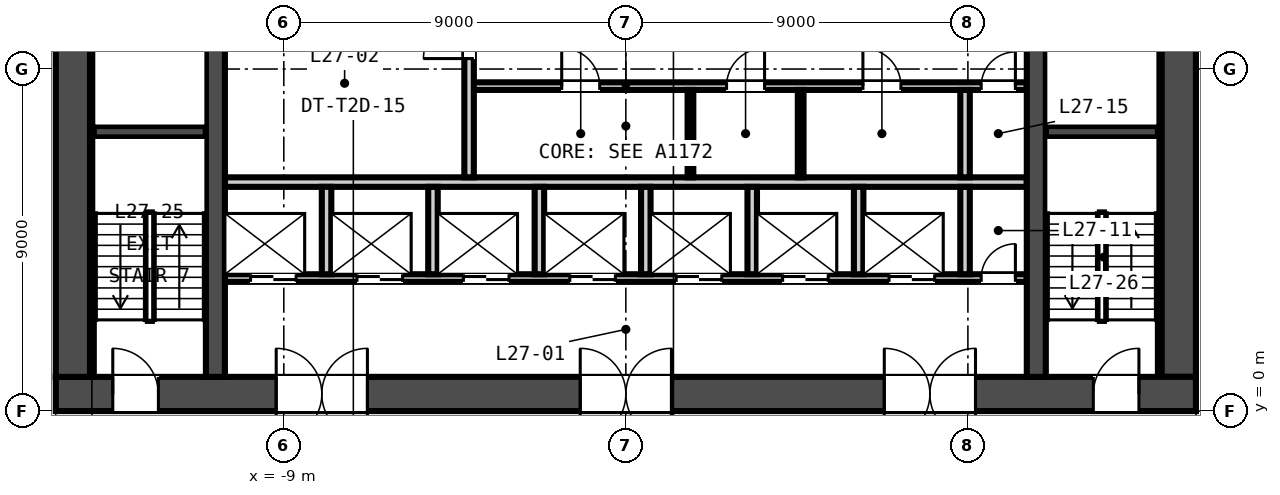
"""IFC4 building model, lengths in metres.
Left out: names, types, materials, properties, quantities, classifications, styles, units other than length and angle.
Written with IfcOpenShell. Run it as: python <this file> out.ifc"""

import sys

from ifc_helpers import new_model, si_unit, direction, frame, frame_2d, origin, place, context, subcontext, project, spatial, rectangle, extrude, element, fill, save


model = new_model("IFC4")
c1 = context("Model", 3, precision=1e-05, world=origin(), true_north=direction((0.0, 1.0)))
c2 = subcontext(c1, "Body", "Model", "MODEL_VIEW")
j1 = project(units=[si_unit("LENGTHUNIT", "METRE"), si_unit("PLANEANGLEUNIT", "RADIAN")], contexts=[c1])
p1 = place(None, origin())
s1 = spatial("IfcSite", under=j1, at=p1, CompositionType="ELEMENT")
p2 = place(p1, origin())
s2 = spatial("IfcBuilding", under=s1, at=p2, CompositionType="ELEMENT")
p3 = place(p2, frame((0.0, 0.0, 113.5)))
s3 = spatial("IfcBuildingStorey", under=s2, at=p3, CompositionType="ELEMENT", Elevation=113.5)
p4 = place(p3, frame((-15.0, 0.45, -0.15), z_axis=(0.0, 0.0, 1.0), x_axis=(1.0, 0.0, 0.0)))
e1 = element("IfcWall", 1, at=p4, inside=s3, PredefinedType="SOLIDWALL", context=c2, shape_type="SweptSolid", body=[
    extrude(rectangle(XDim=30.0, YDim=0.9, at=frame_2d((15.0, 0.0))), origin(), (0.0, 0.0, 1.0), 3.5),
])
p5 = place(p4, frame((5.8, 0.0, 0.15)))
e2 = element("IfcOpeningElement", 2, at=p5, cuts=e1, PredefinedType="OPENING", context=c2, shape_type="SweptSolid", body=[
    extrude(rectangle(XDim=2.4, YDim=2.4, at=frame_2d((1.2, 1.2))), frame((0.0, 0.46, 0.0), z_axis=(0.0, -1.0, 0.0), x_axis=(1.0, 0.0, 0.0)), (0.0, 0.0, 1.0), 0.92),
])
p6 = place(p4, frame((13.8, 0.0, 0.15)))
e3 = element("IfcOpeningElement", 3, at=p6, cuts=e1, PredefinedType="OPENING", context=c2, shape_type="SweptSolid", body=[
    extrude(rectangle(XDim=2.4, YDim=2.4, at=frame_2d((1.2, 1.2))), frame((0.0, 0.46, 0.0), z_axis=(0.0, -1.0, 0.0), x_axis=(1.0, 0.0, 0.0)), (0.0, 0.0, 1.0), 0.92),
])
p7 = place(p4, frame((21.8, 0.0, 0.15)))
e4 = element("IfcOpeningElement", 4, at=p7, cuts=e1, PredefinedType="OPENING", context=c2, shape_type="SweptSolid", body=[
    extrude(rectangle(XDim=2.4, YDim=2.4, at=frame_2d((1.2, 1.2))), frame((0.0, 0.46, 0.0), z_axis=(0.0, -1.0, 0.0), x_axis=(1.0, 0.0, 0.0)), (0.0, 0.0, 1.0), 0.92),
])
p8 = place(p4, frame((1.5, 0.0, 0.15)))
e5 = element("IfcOpeningElement", 5, at=p8, cuts=e1, PredefinedType="OPENING", context=c2, shape_type="SweptSolid", body=[
    extrude(rectangle(XDim=1.2, YDim=2.1, at=frame_2d((0.6, 1.05))), frame((0.0, 0.46, 0.0), z_axis=(0.0, -1.0, 0.0), x_axis=(1.0, 0.0, 0.0)), (0.0, 0.0, 1.0), 0.92),
])
p9 = place(p4, frame((27.3, 0.0, 0.15)))
e6 = element("IfcOpeningElement", 6, at=p9, cuts=e1, PredefinedType="OPENING", context=c2, shape_type="SweptSolid", body=[
    extrude(rectangle(XDim=1.2, YDim=2.1, at=frame_2d((0.6, 1.05))), frame((0.0, 0.46, 0.0), z_axis=(0.0, -1.0, 0.0), x_axis=(1.0, 0.0, 0.0)), (0.0, 0.0, 1.0), 0.92),
])
for number, where, z_axis, x_axis in (
    (7, (-14.55, 0.9, -0.15), (0.0, 0.0, 1.0), (0.0, 1.0, 0.0)),
    (8, (14.55, 0.9, -0.15), (0.0, 0.0, 1.0), (0.0, 1.0, 0.0)),
):
    element("IfcWall", number, at=place(p3, frame(where, z_axis=z_axis, x_axis=x_axis)), inside=s3, PredefinedType="SOLIDWALL", context=c2, shape_type="SweptSolid", body=[
        extrude(rectangle(XDim=13.2, YDim=0.9, at=frame_2d((6.6, 0.0))), origin(), (0.0, 0.0, 1.0), 3.5),
    ])
for number, where, z_axis, x_axis in (
    (9, (-10.8, 0.9, -0.15), (0.0, 0.0, 1.0), (0.0, 1.0, 0.0)),
    (10, (10.8, 0.9, -0.15), (0.0, 0.0, 1.0), (0.0, 1.0, 0.0)),
):
    element("IfcWall", number, at=place(p3, frame(where, z_axis=z_axis, x_axis=x_axis)), inside=s3, PredefinedType="SOLIDWALL", context=c2, shape_type="SweptSolid", body=[
        extrude(rectangle(XDim=13.2, YDim=0.5, at=frame_2d((6.6, 0.0))), origin(), (0.0, 0.0, 1.0), 3.5),
    ])
p10 = place(p3, frame((-10.55, 3.5, 0.0), z_axis=(0.0, 0.0, 1.0), x_axis=(1.0, 0.0, 0.0)))
e11 = element("IfcWall", 11, at=p10, inside=s3, PredefinedType="PARTITIONING", context=c2, shape_type="SweptSolid", body=[
    extrude(rectangle(XDim=21.1, YDim=0.2, at=frame_2d((10.55, 0.0))), origin(), (0.0, 0.0, 1.0), 3.35),
])
p11 = place(p10, frame((0.675, 0.0, 0.0)))
e12 = element("IfcOpeningElement", 12, at=p11, cuts=e11, PredefinedType="OPENING", context=c2, shape_type="SweptSolid", body=[
    extrude(rectangle(XDim=1.2, YDim=2.1, at=frame_2d((0.6, 1.05))), frame((0.0, 0.11, 0.0), z_axis=(0.0, -1.0, 0.0), x_axis=(1.0, 0.0, 0.0)), (0.0, 0.0, 1.0), 0.22),
])
p12 = place(p10, frame((3.475, 0.0, 0.0)))
e13 = element("IfcOpeningElement", 13, at=p12, cuts=e11, PredefinedType="OPENING", context=c2, shape_type="SweptSolid", body=[
    extrude(rectangle(XDim=1.2, YDim=2.1, at=frame_2d((0.6, 1.05))), frame((0.0, 0.11, 0.0), z_axis=(0.0, -1.0, 0.0), x_axis=(1.0, 0.0, 0.0)), (0.0, 0.0, 1.0), 0.22),
])
p13 = place(p10, frame((6.275, 0.0, 0.0)))
e14 = element("IfcOpeningElement", 14, at=p13, cuts=e11, PredefinedType="OPENING", context=c2, shape_type="SweptSolid", body=[
    extrude(rectangle(XDim=1.2, YDim=2.1, at=frame_2d((0.6, 1.05))), frame((0.0, 0.11, 0.0), z_axis=(0.0, -1.0, 0.0), x_axis=(1.0, 0.0, 0.0)), (0.0, 0.0, 1.0), 0.22),
])
p14 = place(p10, frame((9.075, 0.0, 0.0)))
e15 = element("IfcOpeningElement", 15, at=p14, cuts=e11, PredefinedType="OPENING", context=c2, shape_type="SweptSolid", body=[
    extrude(rectangle(XDim=1.2, YDim=2.1, at=frame_2d((0.6, 1.05))), frame((0.0, 0.11, 0.0), z_axis=(0.0, -1.0, 0.0), x_axis=(1.0, 0.0, 0.0)), (0.0, 0.0, 1.0), 0.22),
])
p15 = place(p10, frame((11.875, 0.0, 0.0)))
e16 = element("IfcOpeningElement", 16, at=p15, cuts=e11, PredefinedType="OPENING", context=c2, shape_type="SweptSolid", body=[
    extrude(rectangle(XDim=1.2, YDim=2.1, at=frame_2d((0.6, 1.05))), frame((0.0, 0.11, 0.0), z_axis=(0.0, -1.0, 0.0), x_axis=(1.0, 0.0, 0.0)), (0.0, 0.0, 1.0), 0.22),
])
p16 = place(p10, frame((14.675, 0.0, 0.0)))
e17 = element("IfcOpeningElement", 17, at=p16, cuts=e11, PredefinedType="OPENING", context=c2, shape_type="SweptSolid", body=[
    extrude(rectangle(XDim=1.2, YDim=2.1, at=frame_2d((0.6, 1.05))), frame((0.0, 0.11, 0.0), z_axis=(0.0, -1.0, 0.0), x_axis=(1.0, 0.0, 0.0)), (0.0, 0.0, 1.0), 0.22),
])
p17 = place(p10, frame((17.475, 0.0, 0.0)))
e18 = element("IfcOpeningElement", 18, at=p17, cuts=e11, PredefinedType="OPENING", context=c2, shape_type="SweptSolid", body=[
    extrude(rectangle(XDim=1.2, YDim=2.1, at=frame_2d((0.6, 1.05))), frame((0.0, 0.11, 0.0), z_axis=(0.0, -1.0, 0.0), x_axis=(1.0, 0.0, 0.0)), (0.0, 0.0, 1.0), 0.22),
])
p18 = place(p10, frame((19.9, 0.0, 0.0)))
e19 = element("IfcOpeningElement", 19, at=p18, cuts=e11, PredefinedType="OPENING", context=c2, shape_type="SweptSolid", body=[
    extrude(rectangle(XDim=0.9, YDim=2.1, at=frame_2d((0.45, 1.05))), frame((0.0, 0.11, 0.0), z_axis=(0.0, -1.0, 0.0), x_axis=(1.0, 0.0, 0.0)), (0.0, 0.0, 1.0), 0.22),
])
p19 = place(p3, frame((-10.55, 6.025, 0.0), z_axis=(0.0, 0.0, 1.0), x_axis=(1.0, 0.0, 0.0)))
e20 = element("IfcWall", 20, at=p19, inside=s3, PredefinedType="PARTITIONING", context=c2, shape_type="SweptSolid", body=[
    extrude(rectangle(XDim=21.1, YDim=0.25, at=frame_2d((10.55, 0.0))), origin(), (0.0, 0.0, 1.0), 3.35),
])
p20 = place(p3, frame((-4.125, 8.55, 0.0), z_axis=(0.0, 0.0, 1.0), x_axis=(1.0, 0.0, 0.0)))
e21 = element("IfcWall", 21, at=p20, inside=s3, PredefinedType="PARTITIONING", context=c2, shape_type="SweptSolid", body=[
    extrude(rectangle(XDim=14.675, YDim=0.2, at=frame_2d((7.337, 0.0))), origin(), (0.0, 0.0, 1.0), 3.35),
])
p21 = place(p20, frame((2.438, 0.0, 0.0)))
e22 = element("IfcOpeningElement", 22, at=p21, cuts=e21, PredefinedType="OPENING", context=c2, shape_type="SweptSolid", body=[
    extrude(rectangle(XDim=1.0, YDim=2.1, at=frame_2d((0.5, 1.05))), frame((0.0, 0.11, 0.0), z_axis=(0.0, -1.0, 0.0), x_axis=(1.0, 0.0, 0.0)), (0.0, 0.0, 1.0), 0.22),
])
p22 = place(p20, frame((6.775, 0.0, 0.0)))
e23 = element("IfcOpeningElement", 23, at=p22, cuts=e21, PredefinedType="OPENING", context=c2, shape_type="SweptSolid", body=[
    extrude(rectangle(XDim=1.0, YDim=2.1, at=frame_2d((0.5, 1.05))), frame((0.0, 0.11, 0.0), z_axis=(0.0, -1.0, 0.0), x_axis=(1.0, 0.0, 0.0)), (0.0, 0.0, 1.0), 0.22),
])
p23 = place(p20, frame((10.363, 0.0, 0.0)))
e24 = element("IfcOpeningElement", 24, at=p23, cuts=e21, PredefinedType="OPENING", context=c2, shape_type="SweptSolid", body=[
    extrude(rectangle(XDim=1.0, YDim=2.1, at=frame_2d((0.5, 1.05))), frame((0.0, 0.11, 0.0), z_axis=(0.0, -1.0, 0.0), x_axis=(1.0, 0.0, 0.0)), (0.0, 0.0, 1.0), 0.22),
])
p24 = place(p20, frame((13.475, 0.0, 0.0)))
e25 = element("IfcOpeningElement", 25, at=p24, cuts=e21, PredefinedType="OPENING", context=c2, shape_type="SweptSolid", body=[
    extrude(rectangle(XDim=0.9, YDim=2.1, at=frame_2d((0.45, 1.05))), frame((0.0, 0.11, 0.0), z_axis=(0.0, -1.0, 0.0), x_axis=(1.0, 0.0, 0.0)), (0.0, 0.0, 1.0), 0.22),
])
p25 = place(p3, frame((-4.125, 6.15, 0.0), z_axis=(0.0, 0.0, 1.0), x_axis=(0.0, 1.0, 0.0)))
e26 = element("IfcWall", 26, at=p25, inside=s3, PredefinedType="PARTITIONING", context=c2, shape_type="SweptSolid", body=[
    extrude(rectangle(XDim=4.95, YDim=0.25, at=frame_2d((2.475, 0.0))), origin(), (0.0, 0.0, 1.0), 3.35),
])
p26 = place(p25, frame((3.125, 0.0, 0.0)))
e27 = element("IfcOpeningElement", 27, at=p26, cuts=e26, PredefinedType="OPENING", context=c2, shape_type="SweptSolid", body=[
    extrude(rectangle(XDim=1.2, YDim=2.1, at=frame_2d((0.6, 1.05))), frame((0.0, 0.135, 0.0), z_axis=(0.0, -1.0, 0.0), x_axis=(1.0, 0.0, 0.0)), (0.0, 0.0, 1.0), 0.27),
])
for number, where, z_axis, x_axis in (
    (28, (-7.875, 3.6, 0.0), (0.0, 0.0, 1.0), (0.0, 1.0, 0.0)),
    (29, (-5.075, 3.6, 0.0), (0.0, 0.0, 1.0), (0.0, 1.0, 0.0)),
    (30, (-2.275, 3.6, 0.0), (0.0, 0.0, 1.0), (0.0, 1.0, 0.0)),
    (31, (0.525, 3.6, 0.0), (0.0, 0.0, 1.0), (0.0, 1.0, 0.0)),
    (32, (3.325, 3.6, 0.0), (0.0, 0.0, 1.0), (0.0, 1.0, 0.0)),
    (33, (6.125, 3.6, 0.0), (0.0, 0.0, 1.0), (0.0, 1.0, 0.0)),
    (34, (8.925, 3.6, 0.0), (0.0, 0.0, 1.0), (0.0, 1.0, 0.0)),
):
    element("IfcWall", number, at=place(p3, frame(where, z_axis=z_axis, x_axis=x_axis)), inside=s3, PredefinedType="PARTITIONING", context=c2, shape_type="SweptSolid", body=[
        extrude(rectangle(XDim=2.3, YDim=0.25, at=frame_2d((1.15, 0.0))), origin(), (0.0, 0.0, 1.0), 3.35),
    ])
for number, where, z_axis, x_axis in (
    (35, (1.7, 6.15, 0.0), (0.0, 0.0, 1.0), (0.0, 1.0, 0.0)),
    (36, (4.6, 6.15, 0.0), (0.0, 0.0, 1.0), (0.0, 1.0, 0.0)),
):
    element("IfcWall", number, at=place(p3, frame(where, z_axis=z_axis, x_axis=x_axis)), inside=s3, PredefinedType="PARTITIONING", context=c2, shape_type="SweptSolid", body=[
        extrude(rectangle(XDim=2.3, YDim=0.15, at=frame_2d((1.15, 0.0))), origin(), (0.0, 0.0, 1.0), 3.35),
    ])
p27 = place(p3, frame((8.925, 6.15, 0.0), z_axis=(0.0, 0.0, 1.0), x_axis=(0.0, 1.0, 0.0)))
e37 = element("IfcWall", 37, at=p27, inside=s3, PredefinedType="PARTITIONING", context=c2, shape_type="SweptSolid", body=[
    extrude(rectangle(XDim=2.3, YDim=0.25, at=frame_2d((1.15, 0.0))), origin(), (0.0, 0.0, 1.0), 3.35),
])
p28 = place(p3, frame((-14.0, 7.35, 0.0), z_axis=(0.0, 0.0, 1.0), x_axis=(1.0, 0.0, 0.0)))
e38 = element("IfcWall", 38, at=p28, inside=s3, PredefinedType="SOLIDWALL", context=c2, shape_type="SweptSolid", body=[
    extrude(rectangle(XDim=2.95, YDim=0.3, at=frame_2d((1.475, 0.0))), origin(), (0.0, 0.0, 1.0), 3.35),
])
p29 = place(p3, frame((-14.05, 0.9, 0.0), z_axis=(0.0, 0.0, 1.0), x_axis=(0.0, 1.0, 0.0)))
e39 = element("IfcWall", 39, at=p29, inside=s3, PredefinedType="SOLIDWALL", context=c2, shape_type="SweptSolid", body=[
    extrude(rectangle(XDim=13.2, YDim=0.1, at=frame_2d((6.6, 0.0))), origin(), (0.0, 0.0, 1.0), 3.35),
])
p30 = place(p3, frame((11.05, 7.35, 0.0), z_axis=(0.0, 0.0, 1.0), x_axis=(1.0, 0.0, 0.0)))
e40 = element("IfcWall", 40, at=p30, inside=s3, PredefinedType="SOLIDWALL", context=c2, shape_type="SweptSolid", body=[
    extrude(rectangle(XDim=2.95, YDim=0.3, at=frame_2d((1.475, 0.0))), origin(), (0.0, 0.0, 1.0), 3.35),
])
p31 = place(p3, frame((14.05, 0.9, 0.0), z_axis=(0.0, 0.0, 1.0), x_axis=(0.0, 1.0, 0.0)))
e41 = element("IfcWall", 41, at=p31, inside=s3, PredefinedType="SOLIDWALL", context=c2, shape_type="SweptSolid", body=[
    extrude(rectangle(XDim=13.2, YDim=0.1, at=frame_2d((6.6, 0.0))), origin(), (0.0, 0.0, 1.0), 3.35),
])
p32 = place(p26, origin())
e42 = element("IfcDoor", 42, at=p32, inside=s3, OperationType="SINGLE_SWING_LEFT", PredefinedType="DOOR", context=c2, shape_type="SweptSolid", body=[
    extrude(rectangle(XDim=1.2, YDim=2.1, at=frame_2d((0.6, 1.05))), frame((0.0, 0.025, 0.0), z_axis=(0.0, -1.0, 0.0), x_axis=(1.0, 0.0, 0.0)), (0.0, 0.0, 1.0), 0.05),
])
fill(e27, e42)
p33 = place(p11, origin())
e43 = element("IfcDoor", 43, at=p33, inside=s3, OperationType="DOUBLE_DOOR_SLIDING", PredefinedType="DOOR", context=c2, shape_type="SweptSolid", body=[
    extrude(rectangle(XDim=1.2, YDim=2.1, at=frame_2d((0.6, 1.05))), frame((0.0, 0.025, 0.0), z_axis=(0.0, -1.0, 0.0), x_axis=(1.0, 0.0, 0.0)), (0.0, 0.0, 1.0), 0.05),
])
fill(e12, e43)
p34 = place(p12, origin())
e44 = element("IfcDoor", 44, at=p34, inside=s3, OperationType="DOUBLE_DOOR_SLIDING", PredefinedType="DOOR", context=c2, shape_type="SweptSolid", body=[
    extrude(rectangle(XDim=1.2, YDim=2.1, at=frame_2d((0.6, 1.05))), frame((0.0, 0.025, 0.0), z_axis=(0.0, -1.0, 0.0), x_axis=(1.0, 0.0, 0.0)), (0.0, 0.0, 1.0), 0.05),
])
fill(e13, e44)
p35 = place(p13, origin())
e45 = element("IfcDoor", 45, at=p35, inside=s3, OperationType="DOUBLE_DOOR_SLIDING", PredefinedType="DOOR", context=c2, shape_type="SweptSolid", body=[
    extrude(rectangle(XDim=1.2, YDim=2.1, at=frame_2d((0.6, 1.05))), frame((0.0, 0.025, 0.0), z_axis=(0.0, -1.0, 0.0), x_axis=(1.0, 0.0, 0.0)), (0.0, 0.0, 1.0), 0.05),
])
fill(e14, e45)
p36 = place(p14, origin())
e46 = element("IfcDoor", 46, at=p36, inside=s3, OperationType="DOUBLE_DOOR_SLIDING", PredefinedType="DOOR", context=c2, shape_type="SweptSolid", body=[
    extrude(rectangle(XDim=1.2, YDim=2.1, at=frame_2d((0.6, 1.05))), frame((0.0, 0.025, 0.0), z_axis=(0.0, -1.0, 0.0), x_axis=(1.0, 0.0, 0.0)), (0.0, 0.0, 1.0), 0.05),
])
fill(e15, e46)
p37 = place(p15, origin())
e47 = element("IfcDoor", 47, at=p37, inside=s3, OperationType="DOUBLE_DOOR_SLIDING", PredefinedType="DOOR", context=c2, shape_type="SweptSolid", body=[
    extrude(rectangle(XDim=1.2, YDim=2.1, at=frame_2d((0.6, 1.05))), frame((0.0, 0.025, 0.0), z_axis=(0.0, -1.0, 0.0), x_axis=(1.0, 0.0, 0.0)), (0.0, 0.0, 1.0), 0.05),
])
fill(e16, e47)
p38 = place(p16, origin())
e48 = element("IfcDoor", 48, at=p38, inside=s3, OperationType="DOUBLE_DOOR_SLIDING", PredefinedType="DOOR", context=c2, shape_type="SweptSolid", body=[
    extrude(rectangle(XDim=1.2, YDim=2.1, at=frame_2d((0.6, 1.05))), frame((0.0, 0.025, 0.0), z_axis=(0.0, -1.0, 0.0), x_axis=(1.0, 0.0, 0.0)), (0.0, 0.0, 1.0), 0.05),
])
fill(e17, e48)
p39 = place(p17, origin())
e49 = element("IfcDoor", 49, at=p39, inside=s3, OperationType="DOUBLE_DOOR_SLIDING", PredefinedType="DOOR", context=c2, shape_type="SweptSolid", body=[
    extrude(rectangle(XDim=1.2, YDim=2.1, at=frame_2d((0.6, 1.05))), frame((0.0, 0.025, 0.0), z_axis=(0.0, -1.0, 0.0), x_axis=(1.0, 0.0, 0.0)), (0.0, 0.0, 1.0), 0.05),
])
fill(e18, e49)
p40 = place(p18, origin())
e50 = element("IfcDoor", 50, at=p40, inside=s3, OperationType="SINGLE_SWING_RIGHT", PredefinedType="DOOR", context=c2, shape_type="SweptSolid", body=[
    extrude(rectangle(XDim=0.9, YDim=2.1, at=frame_2d((0.45, 1.05))), frame((0.0, 0.025, 0.0), z_axis=(0.0, -1.0, 0.0), x_axis=(1.0, 0.0, 0.0)), (0.0, 0.0, 1.0), 0.05),
])
fill(e19, e50)
p41 = place(p21, origin())
e51 = element("IfcDoor", 51, at=p41, inside=s3, OperationType="SINGLE_SWING_LEFT", PredefinedType="DOOR", context=c2, shape_type="SweptSolid", body=[
    extrude(rectangle(XDim=1.0, YDim=2.1, at=frame_2d((0.5, 1.05))), frame((0.0, 0.025, 0.0), z_axis=(0.0, -1.0, 0.0), x_axis=(1.0, 0.0, 0.0)), (0.0, 0.0, 1.0), 0.05),
])
fill(e22, e51)
p42 = place(p22, origin())
e52 = element("IfcDoor", 52, at=p42, inside=s3, OperationType="SINGLE_SWING_RIGHT", PredefinedType="DOOR", context=c2, shape_type="SweptSolid", body=[
    extrude(rectangle(XDim=1.0, YDim=2.1, at=frame_2d((0.5, 1.05))), frame((0.0, 0.025, 0.0), z_axis=(0.0, -1.0, 0.0), x_axis=(1.0, 0.0, 0.0)), (0.0, 0.0, 1.0), 0.05),
])
fill(e23, e52)
p43 = place(p23, origin())
e53 = element("IfcDoor", 53, at=p43, inside=s3, OperationType="SINGLE_SWING_LEFT", PredefinedType="DOOR", context=c2, shape_type="SweptSolid", body=[
    extrude(rectangle(XDim=1.0, YDim=2.1, at=frame_2d((0.5, 1.05))), frame((0.0, 0.025, 0.0), z_axis=(0.0, -1.0, 0.0), x_axis=(1.0, 0.0, 0.0)), (0.0, 0.0, 1.0), 0.05),
])
fill(e24, e53)
p44 = place(p24, origin())
e54 = element("IfcDoor", 54, at=p44, inside=s3, OperationType="SINGLE_SWING_RIGHT", PredefinedType="DOOR", context=c2, shape_type="SweptSolid", body=[
    extrude(rectangle(XDim=0.9, YDim=2.1, at=frame_2d((0.45, 1.05))), frame((0.0, 0.025, 0.0), z_axis=(0.0, -1.0, 0.0), x_axis=(1.0, 0.0, 0.0)), (0.0, 0.0, 1.0), 0.05),
])
fill(e25, e54)
p45 = place(p5, origin())
e55 = element("IfcDoor", 55, at=p45, inside=s3, OperationType="DOUBLE_DOOR_DOUBLE_SWING", PredefinedType="DOOR", context=c2, shape_type="SweptSolid", body=[
    extrude(rectangle(XDim=2.4, YDim=2.4, at=frame_2d((1.2, 1.2))), frame((0.0, 0.025, 0.0), z_axis=(0.0, -1.0, 0.0), x_axis=(1.0, 0.0, 0.0)), (0.0, 0.0, 1.0), 0.05),
])
fill(e2, e55)
p46 = place(p6, origin())
e56 = element("IfcDoor", 56, at=p46, inside=s3, OperationType="DOUBLE_DOOR_DOUBLE_SWING", PredefinedType="DOOR", context=c2, shape_type="SweptSolid", body=[
    extrude(rectangle(XDim=2.4, YDim=2.4, at=frame_2d((1.2, 1.2))), frame((0.0, 0.025, 0.0), z_axis=(0.0, -1.0, 0.0), x_axis=(1.0, 0.0, 0.0)), (0.0, 0.0, 1.0), 0.05),
])
fill(e3, e56)
p47 = place(p7, origin())
e57 = element("IfcDoor", 57, at=p47, inside=s3, OperationType="DOUBLE_DOOR_DOUBLE_SWING", PredefinedType="DOOR", context=c2, shape_type="SweptSolid", body=[
    extrude(rectangle(XDim=2.4, YDim=2.4, at=frame_2d((1.2, 1.2))), frame((0.0, 0.025, 0.0), z_axis=(0.0, -1.0, 0.0), x_axis=(1.0, 0.0, 0.0)), (0.0, 0.0, 1.0), 0.05),
])
fill(e4, e57)
p48 = place(p8, origin())
e58 = element("IfcDoor", 58, at=p48, inside=s3, OperationType="SINGLE_SWING_LEFT", PredefinedType="DOOR", context=c2, shape_type="SweptSolid", body=[
    extrude(rectangle(XDim=1.2, YDim=2.1, at=frame_2d((0.6, 1.05))), frame((0.0, 0.025, 0.0), z_axis=(0.0, -1.0, 0.0), x_axis=(1.0, 0.0, 0.0)), (0.0, 0.0, 1.0), 0.05),
])
fill(e5, e58)
p49 = place(p9, origin())
e59 = element("IfcDoor", 59, at=p49, inside=s3, OperationType="SINGLE_SWING_RIGHT", PredefinedType="DOOR", context=c2, shape_type="SweptSolid", body=[
    extrude(rectangle(XDim=1.2, YDim=2.1, at=frame_2d((0.6, 1.05))), frame((0.0, 0.025, 0.0), z_axis=(0.0, -1.0, 0.0), x_axis=(1.0, 0.0, 0.0)), (0.0, 0.0, 1.0), 0.05),
])
fill(e6, e59)
save(model, sys.argv[1])
